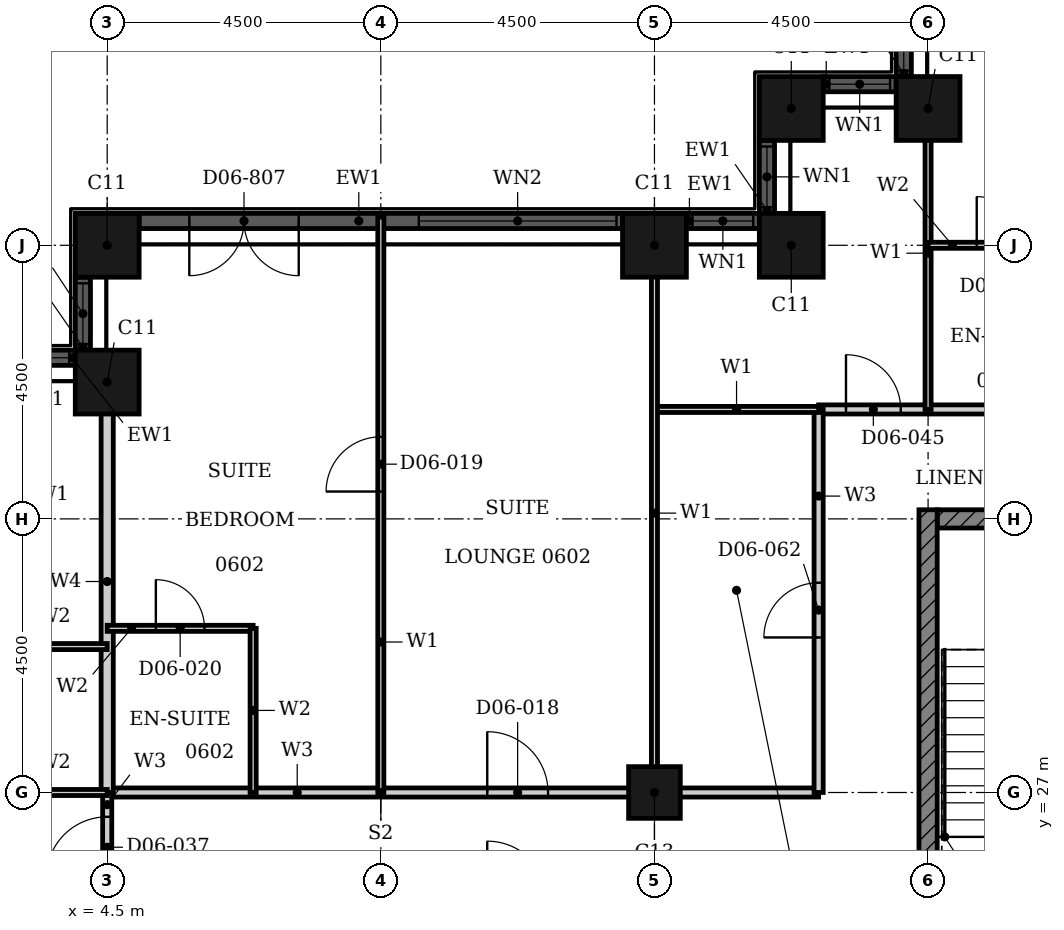
"""IFC4 building model, lengths in metres.
Left out: names, types, materials, properties, quantities, classifications, styles, units other than length and angle.
Written with IfcOpenShell. Run it as: python <this file> out.ifc"""

import sys

from ifc_helpers import new_model, si_unit, direction, frame, frame_2d, origin, origin_2d, place, context, subcontext, project, spatial, rectangle, hollow_rectangle, extrude, element, fill, save


model = new_model("IFC4")
c1 = context("Model", 3, precision=1e-05, world=origin(), true_north=direction((0.0, 1.0)))
c2 = subcontext(c1, "Body", "Model", "MODEL_VIEW")
j1 = project(units=[si_unit("LENGTHUNIT", "METRE"), si_unit("PLANEANGLEUNIT", "RADIAN")], contexts=[c1])
p1 = place(None, origin())
s1 = spatial("IfcSite", under=j1, at=p1, CompositionType="ELEMENT")
p2 = place(p1, origin())
s2 = spatial("IfcBuilding", under=s1, at=p2, CompositionType="ELEMENT")
p3 = place(p2, frame((0.0, 0.0, 33.6)))
s3 = spatial("IfcBuildingStorey", under=s2, at=p3, CompositionType="ELEMENT", Elevation=33.6)
for number, where, z_axis, x_axis in (
    (1, (18.0, 38.25, 0.0), (0.0, 0.0, 1.0), (1.0, 0.0, 0.0)),
    (2, (15.75, 38.25, 0.0), (0.0, 0.0, 1.0), (1.0, 0.0, 0.0)),
    (3, (15.75, 36.0, 0.0), (0.0, 0.0, 1.0), (1.0, 0.0, 0.0)),
    (4, (13.5, 36.0, 0.0), (0.0, 0.0, 1.0), (1.0, 0.0, 0.0)),
    (5, (4.5, 36.0, 0.0), (0.0, 0.0, 1.0), (1.0, 0.0, 0.0)),
    (6, (4.5, 33.75, 0.0), (0.0, 0.0, 1.0), (1.0, 0.0, 0.0)),
):
    element("IfcColumn", number, at=place(p3, frame(where, z_axis=z_axis, x_axis=x_axis)), inside=s3, PredefinedType="COLUMN", context=c2, shape_type="SweptSolid", body=[
        extrude(hollow_rectangle(XDim=1.05, YDim=1.05, WallThickness=0.034, at=origin_2d()), origin(), (0.0, 0.0, 1.0), 3.6),
    ])
p4 = place(p3, frame((13.5, 27.0, 0.0), z_axis=(0.0, 0.0, 1.0), x_axis=(1.0, 0.0, 0.0)))
e7 = element("IfcColumn", 7, at=p4, inside=s3, PredefinedType="COLUMN", context=c2, shape_type="SweptSolid", body=[
    extrude(hollow_rectangle(XDim=0.85, YDim=0.85, WallThickness=0.026, at=origin_2d()), origin(), (0.0, 0.0, 1.0), 3.6),
])
p5 = place(p3, frame((17.6, 39.975, 0.0), z_axis=(0.0, 0.0, 1.0), x_axis=(0.0, -1.0, 0.0)))
e8 = element("IfcWall", 8, at=p5, inside=s3, PredefinedType="SOLIDWALL", context=c2, shape_type="SweptSolid", body=[
    extrude(rectangle(XDim=1.2, YDim=0.25, at=frame_2d((0.6, 0.0))), origin(), (0.0, 0.0, 1.0), 3.6),
])
p6 = place(p5, frame((0.1, 0.0, 0.9)))
e9 = element("IfcOpeningElement", 9, at=p6, cuts=e8, PredefinedType="OPENING", context=c2, shape_type="SweptSolid", body=[
    extrude(rectangle(XDim=1.0, YDim=2.08, at=frame_2d((0.5, 1.04))), frame((0.0, 0.135, 0.0), z_axis=(0.0, -1.0, 0.0), x_axis=(1.0, 0.0, 0.0)), (0.0, 0.0, 1.0), 0.27),
])
p7 = place(p3, frame((17.475, 38.65, 0.0), z_axis=(0.0, 0.0, 1.0), x_axis=(-1.0, 0.0, 0.0)))
e10 = element("IfcWall", 10, at=p7, inside=s3, PredefinedType="SOLIDWALL", context=c2, shape_type="SweptSolid", body=[
    extrude(rectangle(XDim=1.2, YDim=0.25, at=frame_2d((0.6, 0.0))), origin(), (0.0, 0.0, 1.0), 3.6),
])
p8 = place(p7, frame((0.1, 0.0, 0.9)))
e11 = element("IfcOpeningElement", 11, at=p8, cuts=e10, PredefinedType="OPENING", context=c2, shape_type="SweptSolid", body=[
    extrude(rectangle(XDim=1.0, YDim=2.08, at=frame_2d((0.5, 1.04))), frame((0.0, 0.135, 0.0), z_axis=(0.0, -1.0, 0.0), x_axis=(1.0, 0.0, 0.0)), (0.0, 0.0, 1.0), 0.27),
])
p9 = place(p3, frame((15.35, 37.725, 0.0), z_axis=(0.0, 0.0, 1.0), x_axis=(0.0, -1.0, 0.0)))
e12 = element("IfcWall", 12, at=p9, inside=s3, PredefinedType="SOLIDWALL", context=c2, shape_type="SweptSolid", body=[
    extrude(rectangle(XDim=1.2, YDim=0.25, at=frame_2d((0.6, 0.0))), origin(), (0.0, 0.0, 1.0), 3.6),
])
p10 = place(p9, frame((0.1, 0.0, 0.9)))
e13 = element("IfcOpeningElement", 13, at=p10, cuts=e12, PredefinedType="OPENING", context=c2, shape_type="SweptSolid", body=[
    extrude(rectangle(XDim=1.0, YDim=2.08, at=frame_2d((0.5, 1.04))), frame((0.0, 0.135, 0.0), z_axis=(0.0, -1.0, 0.0), x_axis=(1.0, 0.0, 0.0)), (0.0, 0.0, 1.0), 0.27),
])
p11 = place(p3, frame((15.225, 36.4, 0.0), z_axis=(0.0, 0.0, 1.0), x_axis=(-1.0, 0.0, 0.0)))
e14 = element("IfcWall", 14, at=p11, inside=s3, PredefinedType="SOLIDWALL", context=c2, shape_type="SweptSolid", body=[
    extrude(rectangle(XDim=1.2, YDim=0.25, at=frame_2d((0.6, 0.0))), origin(), (0.0, 0.0, 1.0), 3.6),
])
p12 = place(p11, frame((0.1, 0.0, 0.9)))
e15 = element("IfcOpeningElement", 15, at=p12, cuts=e14, PredefinedType="OPENING", context=c2, shape_type="SweptSolid", body=[
    extrude(rectangle(XDim=1.0, YDim=2.08, at=frame_2d((0.5, 1.04))), frame((0.0, 0.135, 0.0), z_axis=(0.0, -1.0, 0.0), x_axis=(1.0, 0.0, 0.0)), (0.0, 0.0, 1.0), 0.27),
])
p13 = place(p3, frame((12.975, 36.4, 0.0), z_axis=(0.0, 0.0, 1.0), x_axis=(-1.0, 0.0, 0.0)))
e16 = element("IfcWall", 16, at=p13, inside=s3, PredefinedType="SOLIDWALL", context=c2, shape_type="SweptSolid", body=[
    extrude(rectangle(XDim=7.95, YDim=0.25, at=frame_2d((3.975, 0.0))), origin(), (0.0, 0.0, 1.0), 3.6),
])
p14 = place(p13, frame((0.1, 0.0, 0.9)))
e17 = element("IfcOpeningElement", 17, at=p14, cuts=e16, PredefinedType="OPENING", context=c2, shape_type="SweptSolid", body=[
    extrude(rectangle(XDim=3.25, YDim=2.08, at=frame_2d((1.625, 1.04))), frame((0.0, 0.135, 0.0), z_axis=(0.0, -1.0, 0.0), x_axis=(1.0, 0.0, 0.0)), (0.0, 0.0, 1.0), 0.27),
])
p15 = place(p13, frame((5.325, 0.0, 0.0)))
e18 = element("IfcOpeningElement", 18, at=p15, cuts=e16, PredefinedType="OPENING", context=c2, shape_type="SweptSolid", body=[
    extrude(rectangle(XDim=1.8, YDim=2.4, at=frame_2d((0.9, 1.2))), frame((0.0, 0.135, 0.0), z_axis=(0.0, -1.0, 0.0), x_axis=(1.0, 0.0, 0.0)), (0.0, 0.0, 1.0), 0.27),
])
p16 = place(p3, frame((4.1, 35.475, 0.0), z_axis=(0.0, 0.0, 1.0), x_axis=(0.0, -1.0, 0.0)))
e19 = element("IfcWall", 19, at=p16, inside=s3, PredefinedType="SOLIDWALL", context=c2, shape_type="SweptSolid", body=[
    extrude(rectangle(XDim=1.2, YDim=0.25, at=frame_2d((0.6, 0.0))), origin(), (0.0, 0.0, 1.0), 3.6),
])
p17 = place(p16, frame((0.1, 0.0, 0.9)))
e20 = element("IfcOpeningElement", 20, at=p17, cuts=e19, PredefinedType="OPENING", context=c2, shape_type="SweptSolid", body=[
    extrude(rectangle(XDim=1.0, YDim=2.08, at=frame_2d((0.5, 1.04))), frame((0.0, 0.135, 0.0), z_axis=(0.0, -1.0, 0.0), x_axis=(1.0, 0.0, 0.0)), (0.0, 0.0, 1.0), 0.27),
])
p18 = place(p3, frame((3.975, 34.15, 0.0), z_axis=(0.0, 0.0, 1.0), x_axis=(-1.0, 0.0, 0.0)))
e21 = element("IfcWall", 21, at=p18, inside=s3, PredefinedType="SOLIDWALL", context=c2, shape_type="SweptSolid", body=[
    extrude(rectangle(XDim=1.2, YDim=0.25, at=frame_2d((0.6, 0.0))), origin(), (0.0, 0.0, 1.0), 3.6),
])
p19 = place(p18, frame((0.1, 0.0, 0.9)))
e22 = element("IfcOpeningElement", 22, at=p19, cuts=e21, PredefinedType="OPENING", context=c2, shape_type="SweptSolid", body=[
    extrude(rectangle(XDim=1.0, YDim=2.08, at=frame_2d((0.5, 1.04))), frame((0.0, 0.135, 0.0), z_axis=(0.0, -1.0, 0.0), x_axis=(1.0, 0.0, 0.0)), (0.0, 0.0, 1.0), 0.27),
])
p20 = place(p3, frame((18.15, 31.5, 0.0), z_axis=(0.0, 0.0, 1.0), x_axis=(1.0, 0.0, 0.0)))
e23 = element("IfcWall", 23, at=p20, inside=s3, PredefinedType="SHEAR", context=c2, shape_type="SweptSolid", body=[
    extrude(rectangle(XDim=6.797, YDim=0.3, at=frame_2d((3.398, 0.0))), origin(), (0.0, 0.0, 1.0), 3.3),
])
p21 = place(p20, frame((4.736, 0.0, 0.0)))
e24 = element("IfcOpeningElement", 24, at=p21, cuts=e23, PredefinedType="OPENING", context=c2, shape_type="SweptSolid", body=[
    extrude(rectangle(XDim=1.8, YDim=2.1, at=frame_2d((0.9, 1.05))), frame((0.0, 0.16, 0.0), z_axis=(0.0, -1.0, 0.0), x_axis=(1.0, 0.0, 0.0)), (0.0, 0.0, 1.0), 0.32),
])
p22 = place(p3, frame((18.0, 22.35, 0.0), z_axis=(0.0, 0.0, 1.0), x_axis=(0.0, 1.0, 0.0)))
e25 = element("IfcWall", 25, at=p22, inside=s3, PredefinedType="SHEAR", context=c2, shape_type="SweptSolid", body=[
    extrude(rectangle(XDim=9.3, YDim=0.3, at=frame_2d((4.65, 0.0))), origin(), (0.0, 0.0, 1.0), 3.3),
])
p23 = place(p3, frame((4.5, 27.0, 0.0), z_axis=(0.0, 0.0, 1.0), x_axis=(1.0, 0.0, 0.0)))
e26 = element("IfcWall", 26, at=p23, inside=s3, PredefinedType="PARTITIONING", context=c2, shape_type="SweptSolid", body=[
    extrude(rectangle(XDim=11.7, YDim=0.15, at=frame_2d((5.85, 0.0))), origin(), (0.0, 0.0, 1.0), 2.58),
])
p24 = place(p23, frame((6.25, 0.0, 0.0)))
e27 = element("IfcOpeningElement", 27, at=p24, cuts=e26, PredefinedType="OPENING", context=c2, shape_type="SweptSolid", body=[
    extrude(rectangle(XDim=1.0, YDim=2.1, at=frame_2d((0.5, 1.05))), frame((0.0, 0.085, 0.0), z_axis=(0.0, -1.0, 0.0), x_axis=(1.0, 0.0, 0.0)), (0.0, 0.0, 1.0), 0.17),
])
p25 = place(p3, frame((16.2, 33.3, 0.0), z_axis=(0.0, 0.0, 1.0), x_axis=(1.0, 0.0, 0.0)))
e28 = element("IfcWall", 28, at=p25, inside=s3, PredefinedType="PARTITIONING", context=c2, shape_type="SweptSolid", body=[
    extrude(rectangle(XDim=15.3, YDim=0.15, at=frame_2d((7.65, 0.0))), origin(), (0.0, 0.0, 1.0), 3.3),
])
p26 = place(p25, frame((4.75, 0.0, 0.0)))
e29 = element("IfcOpeningElement", 29, at=p26, cuts=e28, PredefinedType="OPENING", context=c2, shape_type="SweptSolid", body=[
    extrude(rectangle(XDim=1.0, YDim=2.1, at=frame_2d((0.5, 1.05))), frame((0.0, 0.085, 0.0), z_axis=(0.0, -1.0, 0.0), x_axis=(1.0, 0.0, 0.0)), (0.0, 0.0, 1.0), 0.17),
])
p27 = place(p25, frame((0.45, 0.0, 0.0)))
e30 = element("IfcOpeningElement", 30, at=p27, cuts=e28, PredefinedType="OPENING", context=c2, shape_type="SweptSolid", body=[
    extrude(rectangle(XDim=0.9, YDim=2.1, at=frame_2d((0.45, 1.05))), frame((0.0, 0.085, 0.0), z_axis=(0.0, -1.0, 0.0), x_axis=(1.0, 0.0, 0.0)), (0.0, 0.0, 1.0), 0.17),
])
p28 = place(p25, frame((7.65, 0.0, 0.0)))
e31 = element("IfcOpeningElement", 31, at=p28, cuts=e28, PredefinedType="OPENING", context=c2, shape_type="SweptSolid", body=[
    extrude(rectangle(XDim=0.9, YDim=2.1, at=frame_2d((0.45, 1.05))), frame((0.0, 0.085, 0.0), z_axis=(0.0, -1.0, 0.0), x_axis=(1.0, 0.0, 0.0)), (0.0, 0.0, 1.0), 0.17),
])
p29 = place(p25, frame((12.15, 0.0, 0.0)))
e32 = element("IfcOpeningElement", 32, at=p29, cuts=e28, PredefinedType="OPENING", context=c2, shape_type="SweptSolid", body=[
    extrude(rectangle(XDim=0.9, YDim=2.1, at=frame_2d((0.45, 1.05))), frame((0.0, 0.085, 0.0), z_axis=(0.0, -1.0, 0.0), x_axis=(1.0, 0.0, 0.0)), (0.0, 0.0, 1.0), 0.17),
])
p30 = place(p3, frame((16.2, 27.0, 0.0), z_axis=(0.0, 0.0, 1.0), x_axis=(0.0, 1.0, 0.0)))
e33 = element("IfcWall", 33, at=p30, inside=s3, PredefinedType="PARTITIONING", context=c2, shape_type="SweptSolid", body=[
    extrude(rectangle(XDim=6.3, YDim=0.15, at=frame_2d((3.15, 0.0))), origin(), (0.0, 0.0, 1.0), 3.3),
])
p31 = place(p30, frame((2.55, 0.0, 0.0)))
e34 = element("IfcOpeningElement", 34, at=p31, cuts=e33, PredefinedType="OPENING", context=c2, shape_type="SweptSolid", body=[
    extrude(rectangle(XDim=0.9, YDim=2.1, at=frame_2d((0.45, 1.05))), frame((0.0, 0.085, 0.0), z_axis=(0.0, -1.0, 0.0), x_axis=(1.0, 0.0, 0.0)), (0.0, 0.0, 1.0), 0.17),
])
p32 = place(p3, frame((4.5, 25.2, 0.0), z_axis=(0.0, 0.0, 1.0), x_axis=(0.0, 1.0, 0.0)))
e35 = element("IfcWall", 35, at=p32, inside=s3, PredefinedType="PARTITIONING", context=c2, shape_type="SweptSolid", body=[
    extrude(rectangle(XDim=1.8, YDim=0.15, at=frame_2d((0.9, 0.0))), origin(), (0.0, 0.0, 1.0), 3.3),
])
p33 = place(p32, frame((0.4, 0.0, 0.0)))
e36 = element("IfcOpeningElement", 36, at=p33, cuts=e35, PredefinedType="OPENING", context=c2, shape_type="SweptSolid", body=[
    extrude(rectangle(XDim=1.0, YDim=2.1, at=frame_2d((0.5, 1.05))), frame((0.0, 0.085, 0.0), z_axis=(0.0, -1.0, 0.0), x_axis=(1.0, 0.0, 0.0)), (0.0, 0.0, 1.0), 0.17),
])
p34 = place(p3, frame((13.5, 33.3, 0.0), z_axis=(0.0, 0.0, 1.0), x_axis=(1.0, 0.0, 0.0)))
e37 = element("IfcWall", 37, at=p34, inside=s3, PredefinedType="PARTITIONING", context=c2, shape_type="SweptSolid", body=[
    extrude(rectangle(XDim=2.7, YDim=0.1, at=frame_2d((1.35, 0.0))), origin(), (0.0, 0.0, 1.0), 3.3),
])
p35 = place(p3, frame((13.5, 27.0, 0.0), z_axis=(0.0, 0.0, 1.0), x_axis=(0.0, 1.0, 0.0)))
e38 = element("IfcWall", 38, at=p35, inside=s3, PredefinedType="PARTITIONING", context=c2, shape_type="SweptSolid", body=[
    extrude(rectangle(XDim=9.19, YDim=0.1, at=frame_2d((4.595, 0.0))), origin(), (0.0, 0.0, 1.0), 2.38),
])
p36 = place(p3, frame((18.0, 33.3, 0.0), z_axis=(0.0, 0.0, 1.0), x_axis=(0.0, 1.0, 0.0)))
e39 = element("IfcWall", 39, at=p36, inside=s3, PredefinedType="PARTITIONING", context=c2, shape_type="SweptSolid", body=[
    extrude(rectangle(XDim=5.14, YDim=0.1, at=frame_2d((2.57, 0.0))), origin(), (0.0, 0.0, 1.0), 3.3),
])
p37 = place(p3, frame((9.0, 27.0, 0.0), z_axis=(0.0, 0.0, 1.0), x_axis=(0.0, 1.0, 0.0)))
e40 = element("IfcWall", 40, at=p37, inside=s3, PredefinedType="PARTITIONING", context=c2, shape_type="SweptSolid", body=[
    extrude(rectangle(XDim=9.465, YDim=0.1, at=frame_2d((4.732, 0.0))), origin(), (0.0, 0.0, 1.0), 3.3),
])
p38 = place(p37, frame((4.95, 0.0, 0.0)))
e41 = element("IfcOpeningElement", 41, at=p38, cuts=e40, PredefinedType="OPENING", context=c2, shape_type="SweptSolid", body=[
    extrude(rectangle(XDim=0.9, YDim=2.1, at=frame_2d((0.45, 1.05))), frame((0.0, 0.06, 0.0), z_axis=(0.0, -1.0, 0.0), x_axis=(1.0, 0.0, 0.0)), (0.0, 0.0, 1.0), 0.12),
])
p39 = place(p3, frame((4.5, 27.0, 0.0), z_axis=(0.0, 0.0, 1.0), x_axis=(0.0, 1.0, 0.0)))
e42 = element("IfcWall", 42, at=p39, inside=s3, PredefinedType="PARTITIONING", context=c2, shape_type="SweptSolid", body=[
    extrude(rectangle(XDim=6.94, YDim=0.2, at=frame_2d((3.47, 0.0))), origin(), (0.0, 0.0, 1.0), 3.3),
])
p40 = place(p3, frame((1.8, 27.0, 0.0), z_axis=(0.0, 0.0, 1.0), x_axis=(1.0, 0.0, 0.0)))
e43 = element("IfcWall", 43, at=p40, inside=s3, PredefinedType="PARTITIONING", context=c2, shape_type="SweptSolid", body=[
    extrude(rectangle(XDim=2.7, YDim=0.1, at=frame_2d((1.35, 0.0))), origin(), (0.0, 0.0, 1.0), 2.58),
])
p41 = place(p3, frame((1.8, 29.4, 0.0), z_axis=(0.0, 0.0, 1.0), x_axis=(1.0, 0.0, 0.0)))
e44 = element("IfcWall", 44, at=p41, inside=s3, PredefinedType="PARTITIONING", context=c2, shape_type="SweptSolid", body=[
    extrude(rectangle(XDim=2.7, YDim=0.1, at=frame_2d((1.35, 0.0))), origin(), (0.0, 0.0, 1.0), 3.3),
])
p42 = place(p3, frame((4.5, 29.7, 0.0), z_axis=(0.0, 0.0, 1.0), x_axis=(1.0, 0.0, 0.0)))
e45 = element("IfcWall", 45, at=p42, inside=s3, PredefinedType="PARTITIONING", context=c2, shape_type="SweptSolid", body=[
    extrude(rectangle(XDim=2.4, YDim=0.1, at=frame_2d((1.2, 0.0))), origin(), (0.0, 0.0, 1.0), 3.3),
])
p43 = place(p42, frame((0.8, 0.0, 0.0)))
e46 = element("IfcOpeningElement", 46, at=p43, cuts=e45, PredefinedType="OPENING", context=c2, shape_type="SweptSolid", body=[
    extrude(rectangle(XDim=0.8, YDim=2.1, at=frame_2d((0.4, 1.05))), frame((0.0, 0.06, 0.0), z_axis=(0.0, -1.0, 0.0), x_axis=(1.0, 0.0, 0.0)), (0.0, 0.0, 1.0), 0.12),
])
p44 = place(p3, frame((18.0, 36.0, 0.0), z_axis=(0.0, 0.0, 1.0), x_axis=(1.0, 0.0, 0.0)))
e47 = element("IfcWall", 47, at=p44, inside=s3, PredefinedType="PARTITIONING", context=c2, shape_type="SweptSolid", body=[
    extrude(rectangle(XDim=2.4, YDim=0.1, at=frame_2d((1.2, 0.0))), origin(), (0.0, 0.0, 1.0), 3.3),
])
p45 = place(p44, frame((0.8, 0.0, 0.0)))
e48 = element("IfcOpeningElement", 48, at=p45, cuts=e47, PredefinedType="OPENING", context=c2, shape_type="SweptSolid", body=[
    extrude(rectangle(XDim=0.8, YDim=2.1, at=frame_2d((0.4, 1.05))), frame((0.0, 0.06, 0.0), z_axis=(0.0, -1.0, 0.0), x_axis=(1.0, 0.0, 0.0)), (0.0, 0.0, 1.0), 0.12),
])
p46 = place(p3, frame((6.9, 27.0, 0.0), z_axis=(0.0, 0.0, 1.0), x_axis=(0.0, 1.0, 0.0)))
e49 = element("IfcWall", 49, at=p46, inside=s3, PredefinedType="PARTITIONING", context=c2, shape_type="SweptSolid", body=[
    extrude(rectangle(XDim=2.7, YDim=0.1, at=frame_2d((1.35, 0.0))), origin(), (0.0, 0.0, 1.0), 3.3),
])
p47 = place(p6, origin())
e50 = element("IfcWindow", 50, at=p47, inside=s3, PartitioningType="SINGLE_PANEL", PredefinedType="WINDOW", context=c2, shape_type="SweptSolid", body=[
    extrude(rectangle(XDim=1.0, YDim=2.08, at=frame_2d((0.5, 1.04))), frame((0.0, 0.03, 0.0), z_axis=(0.0, -1.0, 0.0), x_axis=(1.0, 0.0, 0.0)), (0.0, 0.0, 1.0), 0.06),
])
fill(e9, e50)
p48 = place(p8, origin())
e51 = element("IfcWindow", 51, at=p48, inside=s3, PartitioningType="SINGLE_PANEL", PredefinedType="WINDOW", context=c2, shape_type="SweptSolid", body=[
    extrude(rectangle(XDim=1.0, YDim=2.08, at=frame_2d((0.5, 1.04))), frame((0.0, 0.03, 0.0), z_axis=(0.0, -1.0, 0.0), x_axis=(1.0, 0.0, 0.0)), (0.0, 0.0, 1.0), 0.06),
])
fill(e11, e51)
p49 = place(p10, origin())
e52 = element("IfcWindow", 52, at=p49, inside=s3, PartitioningType="SINGLE_PANEL", PredefinedType="WINDOW", context=c2, shape_type="SweptSolid", body=[
    extrude(rectangle(XDim=1.0, YDim=2.08, at=frame_2d((0.5, 1.04))), frame((0.0, 0.03, 0.0), z_axis=(0.0, -1.0, 0.0), x_axis=(1.0, 0.0, 0.0)), (0.0, 0.0, 1.0), 0.06),
])
fill(e13, e52)
p50 = place(p12, origin())
e53 = element("IfcWindow", 53, at=p50, inside=s3, PartitioningType="SINGLE_PANEL", PredefinedType="WINDOW", context=c2, shape_type="SweptSolid", body=[
    extrude(rectangle(XDim=1.0, YDim=2.08, at=frame_2d((0.5, 1.04))), frame((0.0, 0.03, 0.0), z_axis=(0.0, -1.0, 0.0), x_axis=(1.0, 0.0, 0.0)), (0.0, 0.0, 1.0), 0.06),
])
fill(e15, e53)
p51 = place(p14, origin())
e54 = element("IfcWindow", 54, at=p51, inside=s3, PartitioningType="SINGLE_PANEL", PredefinedType="WINDOW", context=c2, shape_type="SweptSolid", body=[
    extrude(rectangle(XDim=3.25, YDim=2.08, at=frame_2d((1.625, 1.04))), frame((0.0, 0.03, 0.0), z_axis=(0.0, -1.0, 0.0), x_axis=(1.0, 0.0, 0.0)), (0.0, 0.0, 1.0), 0.06),
])
fill(e17, e54)
p52 = place(p15, origin())
e55 = element("IfcDoor", 55, at=p52, inside=s3, OperationType="DOUBLE_DOOR_SINGLE_SWING", PredefinedType="DOOR", context=c2, shape_type="SweptSolid", body=[
    extrude(rectangle(XDim=1.8, YDim=2.4, at=frame_2d((0.9, 1.2))), frame((0.0, 0.025, 0.0), z_axis=(0.0, -1.0, 0.0), x_axis=(1.0, 0.0, 0.0)), (0.0, 0.0, 1.0), 0.05),
])
fill(e18, e55)
p53 = place(p17, origin())
e56 = element("IfcWindow", 56, at=p53, inside=s3, PartitioningType="SINGLE_PANEL", PredefinedType="WINDOW", context=c2, shape_type="SweptSolid", body=[
    extrude(rectangle(XDim=1.0, YDim=2.08, at=frame_2d((0.5, 1.04))), frame((0.0, 0.03, 0.0), z_axis=(0.0, -1.0, 0.0), x_axis=(1.0, 0.0, 0.0)), (0.0, 0.0, 1.0), 0.06),
])
fill(e20, e56)
p54 = place(p19, origin())
e57 = element("IfcWindow", 57, at=p54, inside=s3, PartitioningType="SINGLE_PANEL", PredefinedType="WINDOW", context=c2, shape_type="SweptSolid", body=[
    extrude(rectangle(XDim=1.0, YDim=2.08, at=frame_2d((0.5, 1.04))), frame((0.0, 0.03, 0.0), z_axis=(0.0, -1.0, 0.0), x_axis=(1.0, 0.0, 0.0)), (0.0, 0.0, 1.0), 0.06),
])
fill(e22, e57)
p55 = place(p24, origin())
e58 = element("IfcDoor", 58, at=p55, inside=s3, OperationType="SINGLE_SWING_LEFT", PredefinedType="DOOR", context=c2, shape_type="SweptSolid", body=[
    extrude(rectangle(XDim=1.0, YDim=2.1, at=frame_2d((0.5, 1.05))), frame((0.0, 0.025, 0.0), z_axis=(0.0, -1.0, 0.0), x_axis=(1.0, 0.0, 0.0)), (0.0, 0.0, 1.0), 0.05),
])
fill(e27, e58)
p56 = place(p38, origin())
e59 = element("IfcDoor", 59, at=p56, inside=s3, OperationType="SINGLE_SWING_RIGHT", PredefinedType="DOOR", context=c2, shape_type="SweptSolid", body=[
    extrude(rectangle(XDim=0.9, YDim=2.1, at=frame_2d((0.45, 1.05))), frame((0.0, 0.025, 0.0), z_axis=(0.0, -1.0, 0.0), x_axis=(1.0, 0.0, 0.0)), (0.0, 0.0, 1.0), 0.05),
])
fill(e41, e59)
p57 = place(p43, origin())
e60 = element("IfcDoor", 60, at=p57, inside=s3, OperationType="SINGLE_SWING_LEFT", PredefinedType="DOOR", context=c2, shape_type="SweptSolid", body=[
    extrude(rectangle(XDim=0.8, YDim=2.1, at=frame_2d((0.4, 1.05))), frame((0.0, 0.025, 0.0), z_axis=(0.0, -1.0, 0.0), x_axis=(1.0, 0.0, 0.0)), (0.0, 0.0, 1.0), 0.05),
])
fill(e46, e60)
p58 = place(p33, origin())
e61 = element("IfcDoor", 61, at=p58, inside=s3, OperationType="SINGLE_SWING_LEFT", PredefinedType="DOOR", context=c2, shape_type="SweptSolid", body=[
    extrude(rectangle(XDim=1.0, YDim=2.1, at=frame_2d((0.5, 1.05))), frame((0.0, 0.025, 0.0), z_axis=(0.0, -1.0, 0.0), x_axis=(1.0, 0.0, 0.0)), (0.0, 0.0, 1.0), 0.05),
])
fill(e36, e61)
p59 = place(p45, origin())
e62 = element("IfcDoor", 62, at=p59, inside=s3, OperationType="SINGLE_SWING_RIGHT", PredefinedType="DOOR", context=c2, shape_type="SweptSolid", body=[
    extrude(rectangle(XDim=0.8, YDim=2.1, at=frame_2d((0.4, 1.05))), frame((0.0, 0.025, 0.0), z_axis=(0.0, -1.0, 0.0), x_axis=(1.0, 0.0, 0.0)), (0.0, 0.0, 1.0), 0.05),
])
fill(e48, e62)
p60 = place(p27, origin())
e63 = element("IfcDoor", 63, at=p60, inside=s3, OperationType="SINGLE_SWING_LEFT", PredefinedType="DOOR", context=c2, shape_type="SweptSolid", body=[
    extrude(rectangle(XDim=0.9, YDim=2.1, at=frame_2d((0.45, 1.05))), frame((0.0, 0.025, 0.0), z_axis=(0.0, -1.0, 0.0), x_axis=(1.0, 0.0, 0.0)), (0.0, 0.0, 1.0), 0.05),
])
fill(e30, e63)
p61 = place(p31, origin())
e64 = element("IfcDoor", 64, at=p61, inside=s3, OperationType="SINGLE_SWING_LEFT", PredefinedType="DOOR", context=c2, shape_type="SweptSolid", body=[
    extrude(rectangle(XDim=0.9, YDim=2.1, at=frame_2d((0.45, 1.05))), frame((0.0, 0.025, 0.0), z_axis=(0.0, -1.0, 0.0), x_axis=(1.0, 0.0, 0.0)), (0.0, 0.0, 1.0), 0.05),
])
fill(e34, e64)
save(model, sys.argv[1])
